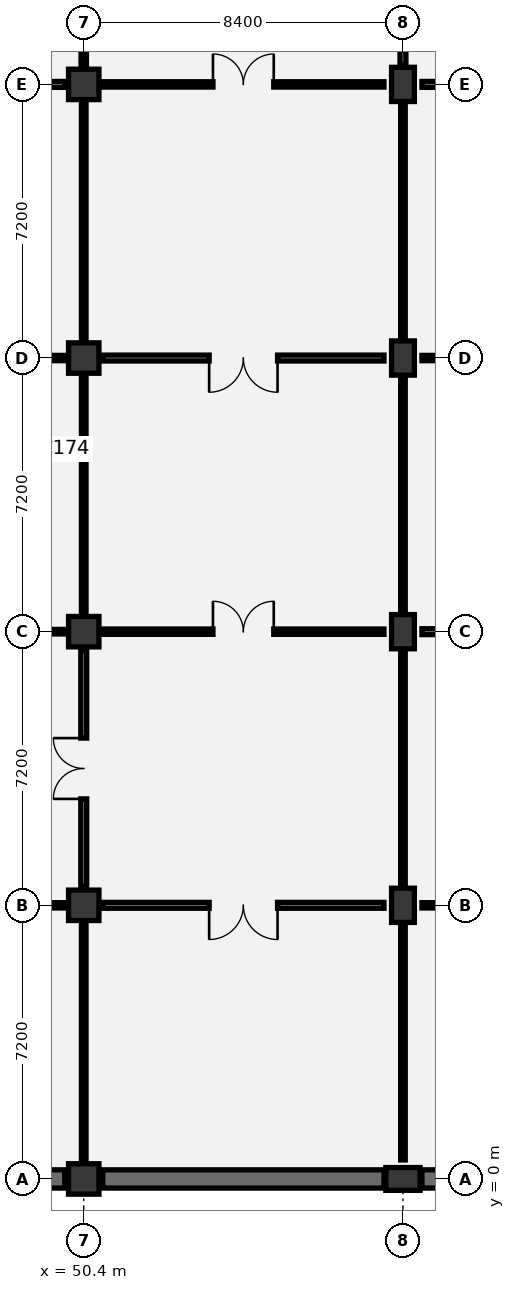
"""IFC4 building model, lengths in metres.
Left out: names, types, materials, properties, quantities, classifications, styles, units other than length and angle.
Written with IfcOpenShell. Run it as: python <this file> out.ifc"""

import sys

from ifc_helpers import new_model, si_unit, direction, frame, frame_2d, origin, origin_2d, place, context, subcontext, project, spatial, rectangle, extrude, element, fill, save


model = new_model("IFC4")
c1 = context("Model", 3, precision=1e-05, world=origin(), true_north=direction((0.0, 1.0)))
c2 = subcontext(c1, "Body", "Model", "MODEL_VIEW")
j1 = project(units=[si_unit("LENGTHUNIT", "METRE"), si_unit("PLANEANGLEUNIT", "RADIAN")], contexts=[c1])
p1 = place(None, origin())
s1 = spatial("IfcSite", under=j1, at=p1, CompositionType="ELEMENT")
p2 = place(p1, origin())
s2 = spatial("IfcBuilding", under=s1, at=p2, CompositionType="ELEMENT")
p3 = place(p2, frame((0.0, 0.0, -4.8)))
s3 = spatial("IfcBuildingStorey", under=s2, at=p3, CompositionType="ELEMENT", Elevation=-4.8)
for number, where, z_axis, x_axis in (
    (1, (50.4, 0.0, 0.0), (0.0, 0.0, 1.0), (1.0, 0.0, 0.0)),
    (2, (50.4, 7.2, 0.0), (0.0, 0.0, 1.0), (1.0, 0.0, 0.0)),
    (3, (50.4, 14.4, 0.0), (0.0, 0.0, 1.0), (1.0, 0.0, 0.0)),
    (4, (50.4, 21.6, 0.0), (0.0, 0.0, 1.0), (1.0, 0.0, 0.0)),
    (5, (50.4, 28.8, 0.0), (0.0, 0.0, 1.0), (1.0, 0.0, 0.0)),
):
    element("IfcColumn", number, at=place(p3, frame(where, z_axis=z_axis, x_axis=x_axis)), inside=s3, PredefinedType="COLUMN", context=c2, shape_type="SweptSolid", body=[
        extrude(rectangle(XDim=0.8, YDim=0.8, at=origin_2d()), origin(), (0.0, 0.0, 1.0), 4.8),
    ])
for number, where, z_axis, x_axis in (
    (6, (58.8, 0.0, 0.0), (0.0, 0.0, 1.0), (0.0, 1.0, 0.0)),
    (7, (58.8, 7.2, 0.0), (0.0, 0.0, 1.0), (1.0, 0.0, 0.0)),
    (8, (58.8, 14.4, 0.0), (0.0, 0.0, 1.0), (1.0, 0.0, 0.0)),
    (9, (58.8, 21.6, 0.0), (0.0, 0.0, 1.0), (1.0, 0.0, 0.0)),
    (10, (58.8, 28.8, 0.0), (0.0, 0.0, 1.0), (1.0, 0.0, 0.0)),
):
    element("IfcColumn", number, at=place(p3, frame(where, z_axis=z_axis, x_axis=x_axis)), inside=s3, PredefinedType="COLUMN", context=c2, shape_type="SweptSolid", body=[
        extrude(rectangle(XDim=0.6, YDim=0.9, at=origin_2d()), origin(), (0.0, 0.0, 1.0), 4.8),
    ])
p4 = place(p3, frame((42.5, 0.0, 0.0), z_axis=(0.0, 0.0, 1.0), x_axis=(1.0, 0.0, 0.0)))
e11 = element("IfcWall", 11, at=p4, inside=s3, PredefinedType="USERDEFINED", context=c2, shape_type="SweptSolid", body=[
    extrude(rectangle(XDim=7.4, YDim=0.48, at=frame_2d((3.7, 0.0))), origin(), (0.0, 0.0, 1.0), 4.45),
])
p5 = place(p3, frame((50.9, 0.0, 0.0), z_axis=(0.0, 0.0, 1.0), x_axis=(1.0, 0.0, 0.0)))
e12 = element("IfcWall", 12, at=p5, inside=s3, PredefinedType="USERDEFINED", context=c2, shape_type="SweptSolid", body=[
    extrude(rectangle(XDim=7.4, YDim=0.48, at=frame_2d((3.7, 0.0))), origin(), (0.0, 0.0, 1.0), 4.45),
])
p6 = place(p3, frame((59.3, 0.0, 0.0), z_axis=(0.0, 0.0, 1.0), x_axis=(1.0, 0.0, 0.0)))
e13 = element("IfcWall", 13, at=p6, inside=s3, PredefinedType="USERDEFINED", context=c2, shape_type="SweptSolid", body=[
    extrude(rectangle(XDim=7.4, YDim=0.48, at=frame_2d((3.7, 0.0))), origin(), (0.0, 0.0, 1.0), 4.45),
])
p7 = place(p3, frame((42.15, 19.2, 0.0), z_axis=(0.0, 0.0, 1.0), x_axis=(1.0, 0.0, 0.0)))
e14 = element("IfcWall", 14, at=p7, inside=s3, PredefinedType="PARTITIONING", context=c2, shape_type="SweptSolid", body=[
    extrude(rectangle(XDim=8.1, YDim=0.12, at=frame_2d((4.05, 0.0))), origin(), (0.0, 0.0, 1.0), 4.45),
])
p8 = place(p7, frame((1.08, 0.0, 0.0)))
e15 = element("IfcOpeningElement", 15, at=p8, cuts=e14, PredefinedType="OPENING", context=c2, shape_type="SweptSolid", body=[
    extrude(rectangle(XDim=0.95, YDim=2.1, at=frame_2d((0.475, 1.05))), frame((0.0, 0.07, 0.0), z_axis=(0.0, -1.0, 0.0), x_axis=(1.0, 0.0, 0.0)), (0.0, 0.0, 1.0), 0.14),
])
p9 = place(p7, frame((3.63, 0.0, 0.0)))
e16 = element("IfcOpeningElement", 16, at=p9, cuts=e14, PredefinedType="OPENING", context=c2, shape_type="SweptSolid", body=[
    extrude(rectangle(XDim=0.9, YDim=2.1, at=frame_2d((0.45, 1.05))), frame((0.0, 0.07, 0.0), z_axis=(0.0, -1.0, 0.0), x_axis=(1.0, 0.0, 0.0)), (0.0, 0.0, 1.0), 0.14),
])
p10 = place(p7, frame((6.13, 0.0, 0.0)))
e17 = element("IfcOpeningElement", 17, at=p10, cuts=e14, PredefinedType="OPENING", context=c2, shape_type="SweptSolid", body=[
    extrude(rectangle(XDim=1.0, YDim=2.1, at=frame_2d((0.5, 1.05))), frame((0.0, 0.07, 0.0), z_axis=(0.0, -1.0, 0.0), x_axis=(1.0, 0.0, 0.0)), (0.0, 0.0, 1.0), 0.14),
])
p11 = place(p3, frame((50.4, 0.5, 0.0), z_axis=(0.0, 0.0, 1.0), x_axis=(0.0, 1.0, 0.0)))
e18 = element("IfcWall", 18, at=p11, inside=s3, PredefinedType="PARTITIONING", context=c2, shape_type="SweptSolid", body=[
    extrude(rectangle(XDim=6.2, YDim=0.12, at=frame_2d((3.1, 0.0))), origin(), (0.0, 0.0, 1.0), 3.645),
])
p12 = place(p3, frame((42.5, 7.2, 0.0), z_axis=(0.0, 0.0, 1.0), x_axis=(1.0, 0.0, 0.0)))
e19 = element("IfcWall", 19, at=p12, inside=s3, PredefinedType="PARTITIONING", context=c2, shape_type="SweptSolid", body=[
    extrude(rectangle(XDim=7.4, YDim=0.14, at=frame_2d((3.7, 0.0))), origin(), (0.0, 0.0, 1.0), 3.545),
])
p13 = place(p12, frame((2.8, 0.0, 0.0)))
e20 = element("IfcOpeningElement", 20, at=p13, cuts=e19, PredefinedType="OPENING", context=c2, shape_type="SweptSolid", body=[
    extrude(rectangle(XDim=1.8, YDim=2.25, at=frame_2d((0.9, 1.125))), frame((0.0, 0.08, 0.0), z_axis=(0.0, -1.0, 0.0), x_axis=(1.0, 0.0, 0.0)), (0.0, 0.0, 1.0), 0.16),
])
p14 = place(p3, frame((50.4, 7.7, 0.0), z_axis=(0.0, 0.0, 1.0), x_axis=(0.0, 1.0, 0.0)))
e21 = element("IfcWall", 21, at=p14, inside=s3, PredefinedType="PARTITIONING", context=c2, shape_type="SweptSolid", body=[
    extrude(rectangle(XDim=6.2, YDim=0.155, at=frame_2d((3.1, 0.0))), origin(), (0.0, 0.0, 1.0), 3.645),
])
p15 = place(p14, frame((2.3, 0.0, 0.0)))
e22 = element("IfcOpeningElement", 22, at=p15, cuts=e21, PredefinedType="OPENING", context=c2, shape_type="SweptSolid", body=[
    extrude(rectangle(XDim=1.6, YDim=2.2, at=frame_2d((0.8, 1.1))), frame((0.0, 0.087, 0.0), z_axis=(0.0, -1.0, 0.0), x_axis=(1.0, 0.0, 0.0)), (0.0, 0.0, 1.0), 0.175),
])
p16 = place(p3, frame((42.5, 14.4, 0.0), z_axis=(0.0, 0.0, 1.0), x_axis=(1.0, 0.0, 0.0)))
e23 = element("IfcWall", 23, at=p16, inside=s3, PredefinedType="PARTITIONING", context=c2, shape_type="SweptSolid", body=[
    extrude(rectangle(XDim=7.4, YDim=0.12, at=frame_2d((3.7, 0.0))), origin(), (0.0, 0.0, 1.0), 3.545),
])
p17 = place(p3, frame((50.4, 14.9, 0.0), z_axis=(0.0, 0.0, 1.0), x_axis=(0.0, 1.0, 0.0)))
e24 = element("IfcWall", 24, at=p17, inside=s3, PredefinedType="PARTITIONING", context=c2, shape_type="SweptSolid", body=[
    extrude(rectangle(XDim=6.2, YDim=0.12, at=frame_2d((3.1, 0.0))), origin(), (0.0, 0.0, 1.0), 3.645),
])
p18 = place(p3, frame((42.5, 21.6, 0.0), z_axis=(0.0, 0.0, 1.0), x_axis=(1.0, 0.0, 0.0)))
e25 = element("IfcWall", 25, at=p18, inside=s3, PredefinedType="PARTITIONING", context=c2, shape_type="SweptSolid", body=[
    extrude(rectangle(XDim=7.4, YDim=0.14, at=frame_2d((3.7, 0.0))), origin(), (0.0, 0.0, 1.0), 3.545),
])
p19 = place(p18, frame((2.8, 0.0, 0.0)))
e26 = element("IfcOpeningElement", 26, at=p19, cuts=e25, PredefinedType="OPENING", context=c2, shape_type="SweptSolid", body=[
    extrude(rectangle(XDim=1.8, YDim=2.25, at=frame_2d((0.9, 1.125))), frame((0.0, 0.08, 0.0), z_axis=(0.0, -1.0, 0.0), x_axis=(1.0, 0.0, 0.0)), (0.0, 0.0, 1.0), 0.16),
])
p20 = place(p3, frame((50.4, 22.1, 0.0), z_axis=(0.0, 0.0, 1.0), x_axis=(0.0, 1.0, 0.0)))
e27 = element("IfcWall", 27, at=p20, inside=s3, PredefinedType="PARTITIONING", context=c2, shape_type="SweptSolid", body=[
    extrude(rectangle(XDim=6.2, YDim=0.12, at=frame_2d((3.1, 0.0))), origin(), (0.0, 0.0, 1.0), 3.645),
])
p21 = place(p3, frame((42.5, 28.8, 0.0), z_axis=(0.0, 0.0, 1.0), x_axis=(1.0, 0.0, 0.0)))
e28 = element("IfcWall", 28, at=p21, inside=s3, PredefinedType="PARTITIONING", context=c2, shape_type="SweptSolid", body=[
    extrude(rectangle(XDim=7.4, YDim=0.155, at=frame_2d((3.7, 0.0))), origin(), (0.0, 0.0, 1.0), 3.545),
])
p22 = place(p21, frame((2.9, 0.0, 0.0)))
e29 = element("IfcOpeningElement", 29, at=p22, cuts=e28, PredefinedType="OPENING", context=c2, shape_type="SweptSolid", body=[
    extrude(rectangle(XDim=1.6, YDim=2.2, at=frame_2d((0.8, 1.1))), frame((0.0, 0.087, 0.0), z_axis=(0.0, -1.0, 0.0), x_axis=(1.0, 0.0, 0.0)), (0.0, 0.0, 1.0), 0.175),
])
p23 = place(p3, frame((50.4, 29.3, 0.0), z_axis=(0.0, 0.0, 1.0), x_axis=(0.0, 1.0, 0.0)))
e30 = element("IfcWall", 30, at=p23, inside=s3, PredefinedType="PARTITIONING", context=c2, shape_type="SweptSolid", body=[
    extrude(rectangle(XDim=6.2, YDim=0.14, at=frame_2d((3.1, 0.0))), origin(), (0.0, 0.0, 1.0), 3.645),
])
p24 = place(p23, frame((2.2, 0.0, 0.0)))
e31 = element("IfcOpeningElement", 31, at=p24, cuts=e30, PredefinedType="OPENING", context=c2, shape_type="SweptSolid", body=[
    extrude(rectangle(XDim=1.8, YDim=2.25, at=frame_2d((0.9, 1.125))), frame((0.0, 0.08, 0.0), z_axis=(0.0, -1.0, 0.0), x_axis=(1.0, 0.0, 0.0)), (0.0, 0.0, 1.0), 0.16),
])
p25 = place(p3, frame((58.8, 0.5, 0.0), z_axis=(0.0, 0.0, 1.0), x_axis=(0.0, 1.0, 0.0)))
e32 = element("IfcWall", 32, at=p25, inside=s3, PredefinedType="PARTITIONING", context=c2, shape_type="SweptSolid", body=[
    extrude(rectangle(XDim=6.2, YDim=0.12, at=frame_2d((3.1, 0.0))), origin(), (0.0, 0.0, 1.0), 3.645),
])
p26 = place(p3, frame((50.9, 7.2, 0.0), z_axis=(0.0, 0.0, 1.0), x_axis=(1.0, 0.0, 0.0)))
e33 = element("IfcWall", 33, at=p26, inside=s3, PredefinedType="PARTITIONING", context=c2, shape_type="SweptSolid", body=[
    extrude(rectangle(XDim=7.4, YDim=0.155, at=frame_2d((3.7, 0.0))), origin(), (0.0, 0.0, 1.0), 3.545),
])
p27 = place(p26, frame((2.8, 0.0, 0.0)))
e34 = element("IfcOpeningElement", 34, at=p27, cuts=e33, PredefinedType="OPENING", context=c2, shape_type="SweptSolid", body=[
    extrude(rectangle(XDim=1.8, YDim=2.25, at=frame_2d((0.9, 1.125))), frame((0.0, 0.087, 0.0), z_axis=(0.0, -1.0, 0.0), x_axis=(1.0, 0.0, 0.0)), (0.0, 0.0, 1.0), 0.175),
])
p28 = place(p3, frame((58.8, 7.7, 0.0), z_axis=(0.0, 0.0, 1.0), x_axis=(0.0, 1.0, 0.0)))
e35 = element("IfcWall", 35, at=p28, inside=s3, PredefinedType="PARTITIONING", context=c2, shape_type="SweptSolid", body=[
    extrude(rectangle(XDim=6.2, YDim=0.12, at=frame_2d((3.1, 0.0))), origin(), (0.0, 0.0, 1.0), 3.645),
])
p29 = place(p3, frame((50.9, 14.4, 0.0), z_axis=(0.0, 0.0, 1.0), x_axis=(1.0, 0.0, 0.0)))
e36 = element("IfcWall", 36, at=p29, inside=s3, PredefinedType="PARTITIONING", context=c2, shape_type="SweptSolid", body=[
    extrude(rectangle(XDim=7.4, YDim=0.14, at=frame_2d((3.7, 0.0))), origin(), (0.0, 0.0, 1.0), 3.545),
])
p30 = place(p29, frame((2.9, 0.0, 0.0)))
e37 = element("IfcOpeningElement", 37, at=p30, cuts=e36, PredefinedType="OPENING", context=c2, shape_type="SweptSolid", body=[
    extrude(rectangle(XDim=1.6, YDim=2.2, at=frame_2d((0.8, 1.1))), frame((0.0, 0.08, 0.0), z_axis=(0.0, -1.0, 0.0), x_axis=(1.0, 0.0, 0.0)), (0.0, 0.0, 1.0), 0.16),
])
p31 = place(p3, frame((58.8, 14.9, 0.0), z_axis=(0.0, 0.0, 1.0), x_axis=(0.0, 1.0, 0.0)))
e38 = element("IfcWall", 38, at=p31, inside=s3, PredefinedType="PARTITIONING", context=c2, shape_type="SweptSolid", body=[
    extrude(rectangle(XDim=6.2, YDim=0.12, at=frame_2d((3.1, 0.0))), origin(), (0.0, 0.0, 1.0), 3.645),
])
p32 = place(p3, frame((50.9, 21.6, 0.0), z_axis=(0.0, 0.0, 1.0), x_axis=(1.0, 0.0, 0.0)))
e39 = element("IfcWall", 39, at=p32, inside=s3, PredefinedType="PARTITIONING", context=c2, shape_type="SweptSolid", body=[
    extrude(rectangle(XDim=7.4, YDim=0.155, at=frame_2d((3.7, 0.0))), origin(), (0.0, 0.0, 1.0), 3.545),
])
p33 = place(p32, frame((2.8, 0.0, 0.0)))
e40 = element("IfcOpeningElement", 40, at=p33, cuts=e39, PredefinedType="OPENING", context=c2, shape_type="SweptSolid", body=[
    extrude(rectangle(XDim=1.8, YDim=2.25, at=frame_2d((0.9, 1.125))), frame((0.0, 0.087, 0.0), z_axis=(0.0, -1.0, 0.0), x_axis=(1.0, 0.0, 0.0)), (0.0, 0.0, 1.0), 0.175),
])
p34 = place(p3, frame((58.8, 22.1, 0.0), z_axis=(0.0, 0.0, 1.0), x_axis=(0.0, 1.0, 0.0)))
e41 = element("IfcWall", 41, at=p34, inside=s3, PredefinedType="PARTITIONING", context=c2, shape_type="SweptSolid", body=[
    extrude(rectangle(XDim=6.2, YDim=0.12, at=frame_2d((3.1, 0.0))), origin(), (0.0, 0.0, 1.0), 3.645),
])
p35 = place(p3, frame((50.9, 28.8, 0.0), z_axis=(0.0, 0.0, 1.0), x_axis=(1.0, 0.0, 0.0)))
e42 = element("IfcWall", 42, at=p35, inside=s3, PredefinedType="PARTITIONING", context=c2, shape_type="SweptSolid", body=[
    extrude(rectangle(XDim=7.4, YDim=0.14, at=frame_2d((3.7, 0.0))), origin(), (0.0, 0.0, 1.0), 3.545),
])
p36 = place(p35, frame((2.9, 0.0, 0.0)))
e43 = element("IfcOpeningElement", 43, at=p36, cuts=e42, PredefinedType="OPENING", context=c2, shape_type="SweptSolid", body=[
    extrude(rectangle(XDim=1.6, YDim=2.2, at=frame_2d((0.8, 1.1))), frame((0.0, 0.08, 0.0), z_axis=(0.0, -1.0, 0.0), x_axis=(1.0, 0.0, 0.0)), (0.0, 0.0, 1.0), 0.16),
])
p37 = place(p3, frame((58.8, 29.3, 0.0), z_axis=(0.0, 0.0, 1.0), x_axis=(0.0, 1.0, 0.0)))
e44 = element("IfcWall", 44, at=p37, inside=s3, PredefinedType="PARTITIONING", context=c2, shape_type="SweptSolid", body=[
    extrude(rectangle(XDim=6.2, YDim=0.155, at=frame_2d((3.1, 0.0))), origin(), (0.0, 0.0, 1.0), 3.645),
])
p38 = place(p37, frame((2.2, 0.0, 0.0)))
e45 = element("IfcOpeningElement", 45, at=p38, cuts=e44, PredefinedType="OPENING", context=c2, shape_type="SweptSolid", body=[
    extrude(rectangle(XDim=1.8, YDim=2.25, at=frame_2d((0.9, 1.125))), frame((0.0, 0.087, 0.0), z_axis=(0.0, -1.0, 0.0), x_axis=(1.0, 0.0, 0.0)), (0.0, 0.0, 1.0), 0.175),
])
p39 = place(p3, frame((59.3, 7.2, 0.0), z_axis=(0.0, 0.0, 1.0), x_axis=(1.0, 0.0, 0.0)))
e46 = element("IfcWall", 46, at=p39, inside=s3, PredefinedType="PARTITIONING", context=c2, shape_type="SweptSolid", body=[
    extrude(rectangle(XDim=7.4, YDim=0.14, at=frame_2d((3.7, 0.0))), origin(), (0.0, 0.0, 1.0), 3.545),
])
p40 = place(p39, frame((2.8, 0.0, 0.0)))
e47 = element("IfcOpeningElement", 47, at=p40, cuts=e46, PredefinedType="OPENING", context=c2, shape_type="SweptSolid", body=[
    extrude(rectangle(XDim=1.8, YDim=2.25, at=frame_2d((0.9, 1.125))), frame((0.0, 0.08, 0.0), z_axis=(0.0, -1.0, 0.0), x_axis=(1.0, 0.0, 0.0)), (0.0, 0.0, 1.0), 0.16),
])
p41 = place(p3, frame((59.3, 14.4, 0.0), z_axis=(0.0, 0.0, 1.0), x_axis=(1.0, 0.0, 0.0)))
e48 = element("IfcWall", 48, at=p41, inside=s3, PredefinedType="PARTITIONING", context=c2, shape_type="SweptSolid", body=[
    extrude(rectangle(XDim=7.4, YDim=0.155, at=frame_2d((3.7, 0.0))), origin(), (0.0, 0.0, 1.0), 3.545),
])
p42 = place(p41, frame((2.9, 0.0, 0.0)))
e49 = element("IfcOpeningElement", 49, at=p42, cuts=e48, PredefinedType="OPENING", context=c2, shape_type="SweptSolid", body=[
    extrude(rectangle(XDim=1.6, YDim=2.2, at=frame_2d((0.8, 1.1))), frame((0.0, 0.087, 0.0), z_axis=(0.0, -1.0, 0.0), x_axis=(1.0, 0.0, 0.0)), (0.0, 0.0, 1.0), 0.175),
])
p43 = place(p3, frame((59.3, 21.6, 0.0), z_axis=(0.0, 0.0, 1.0), x_axis=(1.0, 0.0, 0.0)))
e50 = element("IfcWall", 50, at=p43, inside=s3, PredefinedType="PARTITIONING", context=c2, shape_type="SweptSolid", body=[
    extrude(rectangle(XDim=7.4, YDim=0.14, at=frame_2d((3.7, 0.0))), origin(), (0.0, 0.0, 1.0), 3.545),
])
p44 = place(p43, frame((2.8, 0.0, 0.0)))
e51 = element("IfcOpeningElement", 51, at=p44, cuts=e50, PredefinedType="OPENING", context=c2, shape_type="SweptSolid", body=[
    extrude(rectangle(XDim=1.8, YDim=2.25, at=frame_2d((0.9, 1.125))), frame((0.0, 0.08, 0.0), z_axis=(0.0, -1.0, 0.0), x_axis=(1.0, 0.0, 0.0)), (0.0, 0.0, 1.0), 0.16),
])
p45 = place(p3, frame((59.3, 28.8, 0.0), z_axis=(0.0, 0.0, 1.0), x_axis=(1.0, 0.0, 0.0)))
e52 = element("IfcWall", 52, at=p45, inside=s3, PredefinedType="PARTITIONING", context=c2, shape_type="SweptSolid", body=[
    extrude(rectangle(XDim=7.4, YDim=0.155, at=frame_2d((3.7, 0.0))), origin(), (0.0, 0.0, 1.0), 3.545),
])
p46 = place(p45, frame((2.9, 0.0, 0.0)))
e53 = element("IfcOpeningElement", 53, at=p46, cuts=e52, PredefinedType="OPENING", context=c2, shape_type="SweptSolid", body=[
    extrude(rectangle(XDim=1.6, YDim=2.2, at=frame_2d((0.8, 1.1))), frame((0.0, 0.087, 0.0), z_axis=(0.0, -1.0, 0.0), x_axis=(1.0, 0.0, 0.0)), (0.0, 0.0, 1.0), 0.175),
])
p47 = place(p15, origin())
e54 = element("IfcDoor", 54, at=p47, inside=s3, OperationType="DOUBLE_DOOR_SINGLE_SWING", PredefinedType="DOOR", context=c2, shape_type="SweptSolid", body=[
    extrude(rectangle(XDim=1.6, YDim=2.2, at=frame_2d((0.8, 1.1))), frame((0.0, 0.025, 0.0), z_axis=(0.0, -1.0, 0.0), x_axis=(1.0, 0.0, 0.0)), (0.0, 0.0, 1.0), 0.05),
])
fill(e22, e54)
p48 = place(p27, frame((1.8, 0.0, 0.0), z_axis=(0.0, 0.0, 1.0), x_axis=(-1.0, 0.0, 0.0)))
e55 = element("IfcDoor", 55, at=p48, inside=s3, OperationType="DOUBLE_DOOR_SINGLE_SWING", PredefinedType="DOOR", context=c2, shape_type="SweptSolid", body=[
    extrude(rectangle(XDim=1.8, YDim=2.25, at=frame_2d((0.9, 1.125))), frame((0.0, 0.025, 0.0), z_axis=(0.0, -1.0, 0.0), x_axis=(1.0, 0.0, 0.0)), (0.0, 0.0, 1.0), 0.05),
])
fill(e34, e55)
p49 = place(p30, origin())
e56 = element("IfcDoor", 56, at=p49, inside=s3, OperationType="DOUBLE_DOOR_SINGLE_SWING", PredefinedType="DOOR", context=c2, shape_type="SweptSolid", body=[
    extrude(rectangle(XDim=1.6, YDim=2.2, at=frame_2d((0.8, 1.1))), frame((0.0, 0.025, 0.0), z_axis=(0.0, -1.0, 0.0), x_axis=(1.0, 0.0, 0.0)), (0.0, 0.0, 1.0), 0.05),
])
fill(e37, e56)
p50 = place(p33, frame((1.8, 0.0, 0.0), z_axis=(0.0, 0.0, 1.0), x_axis=(-1.0, 0.0, 0.0)))
e57 = element("IfcDoor", 57, at=p50, inside=s3, OperationType="DOUBLE_DOOR_SINGLE_SWING", PredefinedType="DOOR", context=c2, shape_type="SweptSolid", body=[
    extrude(rectangle(XDim=1.8, YDim=2.25, at=frame_2d((0.9, 1.125))), frame((0.0, 0.025, 0.0), z_axis=(0.0, -1.0, 0.0), x_axis=(1.0, 0.0, 0.0)), (0.0, 0.0, 1.0), 0.05),
])
fill(e40, e57)
p51 = place(p36, origin())
e58 = element("IfcDoor", 58, at=p51, inside=s3, OperationType="DOUBLE_DOOR_SINGLE_SWING", PredefinedType="DOOR", context=c2, shape_type="SweptSolid", body=[
    extrude(rectangle(XDim=1.6, YDim=2.2, at=frame_2d((0.8, 1.1))), frame((0.0, 0.025, 0.0), z_axis=(0.0, -1.0, 0.0), x_axis=(1.0, 0.0, 0.0)), (0.0, 0.0, 1.0), 0.05),
])
fill(e43, e58)
save(model, sys.argv[1])
